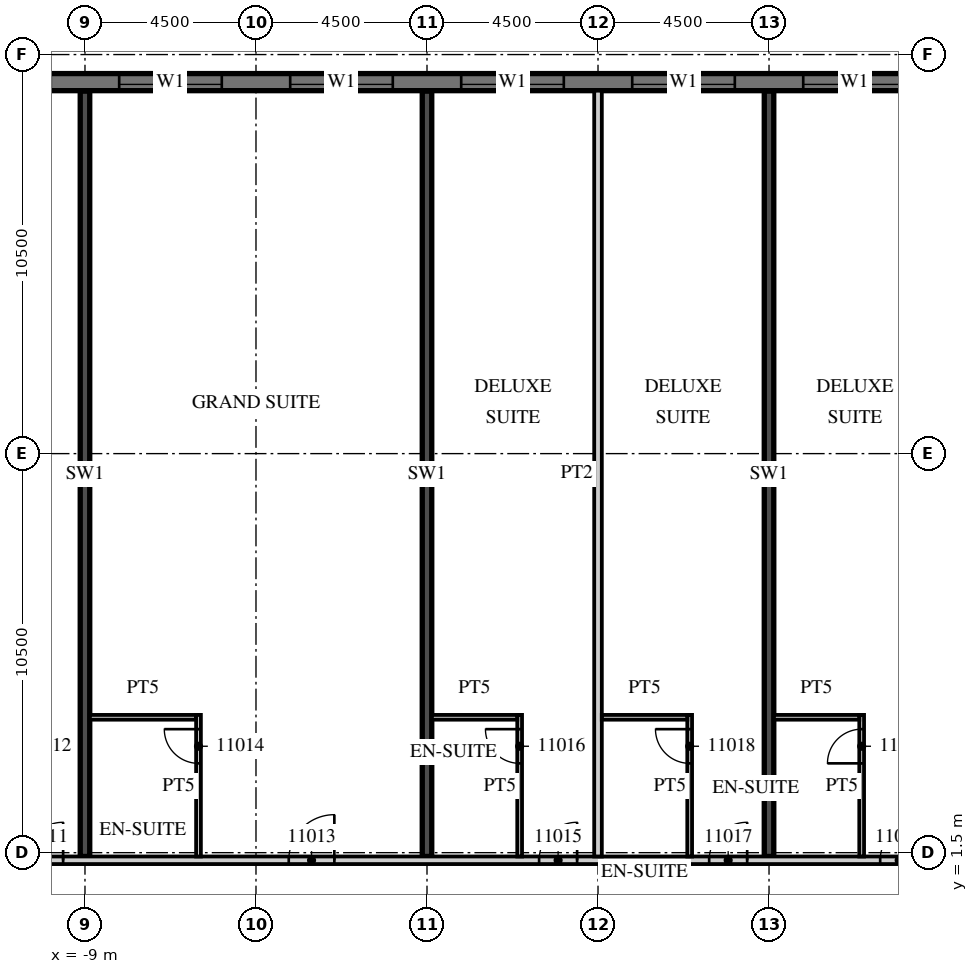
"""IFC4 building model, lengths in metres.
Left out: names, types, materials, properties, quantities, classifications, styles, units other than length and angle.
Written with IfcOpenShell. Run it as: python <this file> out.ifc"""

import sys

from ifc_helpers import new_model, si_unit, direction, frame, frame_2d, origin, place, context, subcontext, project, spatial, rectangle, extrude, element, fill, save


model = new_model("IFC4")
c1 = context("Model", 3, precision=1e-05, world=origin(), true_north=direction((0.0, 1.0)))
c2 = subcontext(c1, "Body", "Model", "MODEL_VIEW")
j1 = project(units=[si_unit("LENGTHUNIT", "METRE"), si_unit("PLANEANGLEUNIT", "RADIAN")], contexts=[c1])
p1 = place(None, origin())
s1 = spatial("IfcSite", under=j1, at=p1, CompositionType="ELEMENT")
p2 = place(p1, origin())
s2 = spatial("IfcBuilding", under=s1, at=p2, CompositionType="ELEMENT")
p3 = place(p2, frame((0.0, 0.0, 66.6)))
s3 = spatial("IfcBuildingStorey", under=s2, at=p3, CompositionType="ELEMENT", Elevation=66.6)
for number, where, z_axis, x_axis in (
    (1, (-9.0, 1.4, 0.0), (0.0, 0.0, 1.0), (0.0, 1.0, 0.0)),
    (2, (0.0, 1.4, 0.0), (0.0, 0.0, 1.0), (0.0, 1.0, 0.0)),
    (3, (9.0, 1.4, 0.0), (0.0, 0.0, 1.0), (0.0, 1.0, 0.0)),
):
    element("IfcWall", number, at=place(p3, frame(where, z_axis=z_axis, x_axis=x_axis)), inside=s3, PredefinedType="SHEAR", context=c2, shape_type="SweptSolid", body=[
        extrude(rectangle(XDim=20.14, YDim=0.25, at=frame_2d((10.07, 0.0))), origin(), (0.0, 0.0, 1.0), 3.3),
    ])
p4 = place(p3, frame((13.5, 21.775, 0.0), z_axis=(0.0, 0.0, 1.0), x_axis=(-1.0, 0.0, 0.0)))
e4 = element("IfcWall", 4, at=p4, inside=s3, PredefinedType="SOLIDWALL", context=c2, shape_type="SweptSolid", body=[
    extrude(rectangle(XDim=54.5, YDim=0.45, at=frame_2d((27.25, 0.0))), origin(), (0.0, 0.0, 1.0), 3.02),
])
p5 = place(p4, frame((0.9, 0.0, 0.45)))
e5 = element("IfcOpeningElement", 5, at=p5, cuts=e4, PredefinedType="OPENING", context=c2, shape_type="SweptSolid", body=[
    extrude(rectangle(XDim=2.7, YDim=2.25, at=frame_2d((1.35, 1.125))), frame((0.0, 0.235, 0.0), z_axis=(0.0, -1.0, 0.0), x_axis=(1.0, 0.0, 0.0)), (0.0, 0.0, 1.0), 0.47),
])
p6 = place(p4, frame((5.4, 0.0, 0.45)))
e6 = element("IfcOpeningElement", 6, at=p6, cuts=e4, PredefinedType="OPENING", context=c2, shape_type="SweptSolid", body=[
    extrude(rectangle(XDim=2.7, YDim=2.25, at=frame_2d((1.35, 1.125))), frame((0.0, 0.235, 0.0), z_axis=(0.0, -1.0, 0.0), x_axis=(1.0, 0.0, 0.0)), (0.0, 0.0, 1.0), 0.47),
])
p7 = place(p4, frame((9.9, 0.0, 0.45)))
e7 = element("IfcOpeningElement", 7, at=p7, cuts=e4, PredefinedType="OPENING", context=c2, shape_type="SweptSolid", body=[
    extrude(rectangle(XDim=2.7, YDim=2.25, at=frame_2d((1.35, 1.125))), frame((0.0, 0.235, 0.0), z_axis=(0.0, -1.0, 0.0), x_axis=(1.0, 0.0, 0.0)), (0.0, 0.0, 1.0), 0.47),
])
p8 = place(p4, frame((14.4, 0.0, 0.45)))
e8 = element("IfcOpeningElement", 8, at=p8, cuts=e4, PredefinedType="OPENING", context=c2, shape_type="SweptSolid", body=[
    extrude(rectangle(XDim=2.7, YDim=2.25, at=frame_2d((1.35, 1.125))), frame((0.0, 0.235, 0.0), z_axis=(0.0, -1.0, 0.0), x_axis=(1.0, 0.0, 0.0)), (0.0, 0.0, 1.0), 0.47),
])
p9 = place(p4, frame((18.9, 0.0, 0.45)))
e9 = element("IfcOpeningElement", 9, at=p9, cuts=e4, PredefinedType="OPENING", context=c2, shape_type="SweptSolid", body=[
    extrude(rectangle(XDim=2.7, YDim=2.25, at=frame_2d((1.35, 1.125))), frame((0.0, 0.235, 0.0), z_axis=(0.0, -1.0, 0.0), x_axis=(1.0, 0.0, 0.0)), (0.0, 0.0, 1.0), 0.47),
])
p10 = place(p4, frame((23.4, 0.0, 0.45)))
e10 = element("IfcOpeningElement", 10, at=p10, cuts=e4, PredefinedType="OPENING", context=c2, shape_type="SweptSolid", body=[
    extrude(rectangle(XDim=2.7, YDim=2.25, at=frame_2d((1.35, 1.125))), frame((0.0, 0.235, 0.0), z_axis=(0.0, -1.0, 0.0), x_axis=(1.0, 0.0, 0.0)), (0.0, 0.0, 1.0), 0.47),
])
p11 = place(p4, frame((27.9, 0.0, 0.45)))
e11 = element("IfcOpeningElement", 11, at=p11, cuts=e4, PredefinedType="OPENING", context=c2, shape_type="SweptSolid", body=[
    extrude(rectangle(XDim=2.7, YDim=2.25, at=frame_2d((1.35, 1.125))), frame((0.0, 0.235, 0.0), z_axis=(0.0, -1.0, 0.0), x_axis=(1.0, 0.0, 0.0)), (0.0, 0.0, 1.0), 0.47),
])
p12 = place(p4, frame((32.4, 0.0, 0.45)))
e12 = element("IfcOpeningElement", 12, at=p12, cuts=e4, PredefinedType="OPENING", context=c2, shape_type="SweptSolid", body=[
    extrude(rectangle(XDim=2.7, YDim=2.25, at=frame_2d((1.35, 1.125))), frame((0.0, 0.235, 0.0), z_axis=(0.0, -1.0, 0.0), x_axis=(1.0, 0.0, 0.0)), (0.0, 0.0, 1.0), 0.47),
])
p13 = place(p4, frame((36.9, 0.0, 0.45)))
e13 = element("IfcOpeningElement", 13, at=p13, cuts=e4, PredefinedType="OPENING", context=c2, shape_type="SweptSolid", body=[
    extrude(rectangle(XDim=2.7, YDim=2.25, at=frame_2d((1.35, 1.125))), frame((0.0, 0.235, 0.0), z_axis=(0.0, -1.0, 0.0), x_axis=(1.0, 0.0, 0.0)), (0.0, 0.0, 1.0), 0.47),
])
p14 = place(p4, frame((41.4, 0.0, 0.45)))
e14 = element("IfcOpeningElement", 14, at=p14, cuts=e4, PredefinedType="OPENING", context=c2, shape_type="SweptSolid", body=[
    extrude(rectangle(XDim=2.7, YDim=2.25, at=frame_2d((1.35, 1.125))), frame((0.0, 0.235, 0.0), z_axis=(0.0, -1.0, 0.0), x_axis=(1.0, 0.0, 0.0)), (0.0, 0.0, 1.0), 0.47),
])
p15 = place(p4, frame((45.9, 0.0, 0.45)))
e15 = element("IfcOpeningElement", 15, at=p15, cuts=e4, PredefinedType="OPENING", context=c2, shape_type="SweptSolid", body=[
    extrude(rectangle(XDim=2.7, YDim=2.25, at=frame_2d((1.35, 1.125))), frame((0.0, 0.235, 0.0), z_axis=(0.0, -1.0, 0.0), x_axis=(1.0, 0.0, 0.0)), (0.0, 0.0, 1.0), 0.47),
])
p16 = place(p4, frame((50.4, 0.0, 0.45)))
e16 = element("IfcOpeningElement", 16, at=p16, cuts=e4, PredefinedType="OPENING", context=c2, shape_type="SweptSolid", body=[
    extrude(rectangle(XDim=2.7, YDim=2.25, at=frame_2d((1.35, 1.125))), frame((0.0, 0.235, 0.0), z_axis=(0.0, -1.0, 0.0), x_axis=(1.0, 0.0, 0.0)), (0.0, 0.0, 1.0), 0.47),
])
p17 = place(p3, frame((-44.55, 1.3, 0.0), z_axis=(0.0, 0.0, 1.0), x_axis=(1.0, 0.0, 0.0)))
e17 = element("IfcWall", 17, at=p17, inside=s3, PredefinedType="PARTITIONING", context=c2, shape_type="SweptSolid", body=[
    extrude(rectangle(XDim=58.05, YDim=0.2, at=frame_2d((29.025, 0.0))), origin(), (0.0, 0.0, 1.0), 3.02),
])
p18 = place(p17, frame((0.525, 0.0, 0.0)))
e18 = element("IfcOpeningElement", 18, at=p18, cuts=e17, PredefinedType="OPENING", context=c2, shape_type="SweptSolid", body=[
    extrude(rectangle(XDim=1.0, YDim=2.1, at=frame_2d((0.5, 1.05))), frame((0.0, 0.11, 0.0), z_axis=(0.0, -1.0, 0.0), x_axis=(1.0, 0.0, 0.0)), (0.0, 0.0, 1.0), 0.22),
])
p19 = place(p17, frame((6.975, 0.0, 0.0)))
e19 = element("IfcOpeningElement", 19, at=p19, cuts=e17, PredefinedType="OPENING", context=c2, shape_type="SweptSolid", body=[
    extrude(rectangle(XDim=1.0, YDim=2.1, at=frame_2d((0.5, 1.05))), frame((0.0, 0.11, 0.0), z_axis=(0.0, -1.0, 0.0), x_axis=(1.0, 0.0, 0.0)), (0.0, 0.0, 1.0), 0.22),
])
p20 = place(p17, frame((10.987, 0.0, 0.0)))
e20 = element("IfcOpeningElement", 20, at=p20, cuts=e17, PredefinedType="OPENING", context=c2, shape_type="SweptSolid", body=[
    extrude(rectangle(XDim=1.2, YDim=2.1, at=frame_2d((0.6, 1.05))), frame((0.0, 0.11, 0.0), z_axis=(0.0, -1.0, 0.0), x_axis=(1.0, 0.0, 0.0)), (0.0, 0.0, 1.0), 0.22),
])
p21 = place(p17, frame((19.987, 0.0, 0.0)))
e21 = element("IfcOpeningElement", 21, at=p21, cuts=e17, PredefinedType="OPENING", context=c2, shape_type="SweptSolid", body=[
    extrude(rectangle(XDim=1.2, YDim=2.1, at=frame_2d((0.6, 1.05))), frame((0.0, 0.11, 0.0), z_axis=(0.0, -1.0, 0.0), x_axis=(1.0, 0.0, 0.0)), (0.0, 0.0, 1.0), 0.22),
])
p22 = place(p17, frame((29.5, 0.0, 0.0)))
e22 = element("IfcOpeningElement", 22, at=p22, cuts=e17, PredefinedType="OPENING", context=c2, shape_type="SweptSolid", body=[
    extrude(rectangle(XDim=1.0, YDim=2.1, at=frame_2d((0.5, 1.05))), frame((0.0, 0.11, 0.0), z_axis=(0.0, -1.0, 0.0), x_axis=(1.0, 0.0, 0.0)), (0.0, 0.0, 1.0), 0.22),
])
p23 = place(p17, frame((33.975, 0.0, 0.0)))
e23 = element("IfcOpeningElement", 23, at=p23, cuts=e17, PredefinedType="OPENING", context=c2, shape_type="SweptSolid", body=[
    extrude(rectangle(XDim=1.0, YDim=2.1, at=frame_2d((0.5, 1.05))), frame((0.0, 0.11, 0.0), z_axis=(0.0, -1.0, 0.0), x_axis=(1.0, 0.0, 0.0)), (0.0, 0.0, 1.0), 0.22),
])
p24 = place(p17, frame((40.912, 0.0, 0.0)))
e24 = element("IfcOpeningElement", 24, at=p24, cuts=e17, PredefinedType="OPENING", context=c2, shape_type="SweptSolid", body=[
    extrude(rectangle(XDim=1.2, YDim=2.1, at=frame_2d((0.6, 1.05))), frame((0.0, 0.11, 0.0), z_axis=(0.0, -1.0, 0.0), x_axis=(1.0, 0.0, 0.0)), (0.0, 0.0, 1.0), 0.22),
])
p25 = place(p17, frame((47.5, 0.0, 0.0)))
e25 = element("IfcOpeningElement", 25, at=p25, cuts=e17, PredefinedType="OPENING", context=c2, shape_type="SweptSolid", body=[
    extrude(rectangle(XDim=1.0, YDim=2.1, at=frame_2d((0.5, 1.05))), frame((0.0, 0.11, 0.0), z_axis=(0.0, -1.0, 0.0), x_axis=(1.0, 0.0, 0.0)), (0.0, 0.0, 1.0), 0.22),
])
p26 = place(p17, frame((51.975, 0.0, 0.0)))
e26 = element("IfcOpeningElement", 26, at=p26, cuts=e17, PredefinedType="OPENING", context=c2, shape_type="SweptSolid", body=[
    extrude(rectangle(XDim=1.0, YDim=2.1, at=frame_2d((0.5, 1.05))), frame((0.0, 0.11, 0.0), z_axis=(0.0, -1.0, 0.0), x_axis=(1.0, 0.0, 0.0)), (0.0, 0.0, 1.0), 0.22),
])
p27 = place(p17, frame((56.475, 0.0, 0.0)))
e27 = element("IfcOpeningElement", 27, at=p27, cuts=e17, PredefinedType="OPENING", context=c2, shape_type="SweptSolid", body=[
    extrude(rectangle(XDim=1.0, YDim=2.1, at=frame_2d((0.5, 1.05))), frame((0.0, 0.11, 0.0), z_axis=(0.0, -1.0, 0.0), x_axis=(1.0, 0.0, 0.0)), (0.0, 0.0, 1.0), 0.22),
])
p28 = place(p3, frame((-6.013, 1.4, 0.0), z_axis=(0.0, 0.0, 1.0), x_axis=(0.0, 1.0, 0.0)))
e28 = element("IfcWall", 28, at=p28, inside=s3, PredefinedType="PARTITIONING", context=c2, shape_type="SweptSolid", body=[
    extrude(rectangle(XDim=3.725, YDim=0.125, at=frame_2d((1.863, 0.0))), origin(), (0.0, 0.0, 1.0), 3.02),
])
p29 = place(p28, frame((2.45, 0.0, 0.0)))
e29 = element("IfcOpeningElement", 29, at=p29, cuts=e28, PredefinedType="OPENING", context=c2, shape_type="SweptSolid", body=[
    extrude(rectangle(XDim=0.9, YDim=2.1, at=frame_2d((0.45, 1.05))), frame((0.0, 0.073, 0.0), z_axis=(0.0, -1.0, 0.0), x_axis=(1.0, 0.0, 0.0)), (0.0, 0.0, 1.0), 0.145),
])
p30 = place(p3, frame((-8.875, 5.062, 0.0), z_axis=(0.0, 0.0, 1.0), x_axis=(1.0, 0.0, 0.0)))
e30 = element("IfcWall", 30, at=p30, inside=s3, PredefinedType="PARTITIONING", context=c2, shape_type="SweptSolid", body=[
    extrude(rectangle(XDim=2.8, YDim=0.125, at=frame_2d((1.4, 0.0))), origin(), (0.0, 0.0, 1.0), 3.02),
])
p31 = place(p3, frame((4.5, 1.4, 0.0), z_axis=(0.0, 0.0, 1.0), x_axis=(0.0, 1.0, 0.0)))
e31 = element("IfcWall", 31, at=p31, inside=s3, PredefinedType="PARTITIONING", context=c2, shape_type="SweptSolid", body=[
    extrude(rectangle(XDim=20.15, YDim=0.2, at=frame_2d((10.075, 0.0))), origin(), (0.0, 0.0, 1.0), 3.02),
])
p32 = place(p3, frame((2.438, 1.4, 0.0), z_axis=(0.0, 0.0, 1.0), x_axis=(0.0, 1.0, 0.0)))
e32 = element("IfcWall", 32, at=p32, inside=s3, PredefinedType="PARTITIONING", context=c2, shape_type="SweptSolid", body=[
    extrude(rectangle(XDim=3.725, YDim=0.125, at=frame_2d((1.863, 0.0))), origin(), (0.0, 0.0, 1.0), 3.02),
])
p33 = place(p32, frame((2.45, 0.0, 0.0)))
e33 = element("IfcOpeningElement", 33, at=p33, cuts=e32, PredefinedType="OPENING", context=c2, shape_type="SweptSolid", body=[
    extrude(rectangle(XDim=0.9, YDim=2.1, at=frame_2d((0.45, 1.05))), frame((0.0, 0.073, 0.0), z_axis=(0.0, -1.0, 0.0), x_axis=(1.0, 0.0, 0.0)), (0.0, 0.0, 1.0), 0.145),
])
p34 = place(p3, frame((0.125, 5.062, 0.0), z_axis=(0.0, 0.0, 1.0), x_axis=(1.0, 0.0, 0.0)))
e34 = element("IfcWall", 34, at=p34, inside=s3, PredefinedType="PARTITIONING", context=c2, shape_type="SweptSolid", body=[
    extrude(rectangle(XDim=2.25, YDim=0.125, at=frame_2d((1.125, 0.0))), origin(), (0.0, 0.0, 1.0), 3.02),
])
p35 = place(p3, frame((6.912, 1.4, 0.0), z_axis=(0.0, 0.0, 1.0), x_axis=(0.0, 1.0, 0.0)))
e35 = element("IfcWall", 35, at=p35, inside=s3, PredefinedType="PARTITIONING", context=c2, shape_type="SweptSolid", body=[
    extrude(rectangle(XDim=3.725, YDim=0.125, at=frame_2d((1.863, 0.0))), origin(), (0.0, 0.0, 1.0), 3.02),
])
p36 = place(p35, frame((2.45, 0.0, 0.0)))
e36 = element("IfcOpeningElement", 36, at=p36, cuts=e35, PredefinedType="OPENING", context=c2, shape_type="SweptSolid", body=[
    extrude(rectangle(XDim=0.9, YDim=2.1, at=frame_2d((0.45, 1.05))), frame((0.0, 0.073, 0.0), z_axis=(0.0, -1.0, 0.0), x_axis=(1.0, 0.0, 0.0)), (0.0, 0.0, 1.0), 0.145),
])
p37 = place(p3, frame((4.6, 5.062, 0.0), z_axis=(0.0, 0.0, 1.0), x_axis=(1.0, 0.0, 0.0)))
e37 = element("IfcWall", 37, at=p37, inside=s3, PredefinedType="PARTITIONING", context=c2, shape_type="SweptSolid", body=[
    extrude(rectangle(XDim=2.25, YDim=0.125, at=frame_2d((1.125, 0.0))), origin(), (0.0, 0.0, 1.0), 3.02),
])
p38 = place(p3, frame((11.438, 1.4, 0.0), z_axis=(0.0, 0.0, 1.0), x_axis=(0.0, 1.0, 0.0)))
e38 = element("IfcWall", 38, at=p38, inside=s3, PredefinedType="PARTITIONING", context=c2, shape_type="SweptSolid", body=[
    extrude(rectangle(XDim=3.725, YDim=0.125, at=frame_2d((1.863, 0.0))), origin(), (0.0, 0.0, 1.0), 3.02),
])
p39 = place(p38, frame((2.45, 0.0, 0.0)))
e39 = element("IfcOpeningElement", 39, at=p39, cuts=e38, PredefinedType="OPENING", context=c2, shape_type="SweptSolid", body=[
    extrude(rectangle(XDim=0.9, YDim=2.1, at=frame_2d((0.45, 1.05))), frame((0.0, 0.073, 0.0), z_axis=(0.0, -1.0, 0.0), x_axis=(1.0, 0.0, 0.0)), (0.0, 0.0, 1.0), 0.145),
])
p40 = place(p3, frame((9.125, 5.062, 0.0), z_axis=(0.0, 0.0, 1.0), x_axis=(1.0, 0.0, 0.0)))
e40 = element("IfcWall", 40, at=p40, inside=s3, PredefinedType="PARTITIONING", context=c2, shape_type="SweptSolid", body=[
    extrude(rectangle(XDim=2.25, YDim=0.125, at=frame_2d((1.125, 0.0))), origin(), (0.0, 0.0, 1.0), 3.02),
])
p41 = place(p5, origin())
e41 = element("IfcWindow", 41, at=p41, inside=s3, PartitioningType="SINGLE_PANEL", PredefinedType="WINDOW", context=c2, shape_type="SweptSolid", body=[
    extrude(rectangle(XDim=2.7, YDim=2.25, at=frame_2d((1.35, 1.125))), frame((0.0, 0.09, 0.0), z_axis=(0.0, -1.0, 0.0), x_axis=(1.0, 0.0, 0.0)), (0.0, 0.0, 1.0), 0.06),
])
fill(e5, e41)
p42 = place(p6, origin())
e42 = element("IfcWindow", 42, at=p42, inside=s3, PartitioningType="SINGLE_PANEL", PredefinedType="WINDOW", context=c2, shape_type="SweptSolid", body=[
    extrude(rectangle(XDim=2.7, YDim=2.25, at=frame_2d((1.35, 1.125))), frame((0.0, 0.09, 0.0), z_axis=(0.0, -1.0, 0.0), x_axis=(1.0, 0.0, 0.0)), (0.0, 0.0, 1.0), 0.06),
])
fill(e6, e42)
p43 = place(p7, origin())
e43 = element("IfcWindow", 43, at=p43, inside=s3, PartitioningType="SINGLE_PANEL", PredefinedType="WINDOW", context=c2, shape_type="SweptSolid", body=[
    extrude(rectangle(XDim=2.7, YDim=2.25, at=frame_2d((1.35, 1.125))), frame((0.0, 0.09, 0.0), z_axis=(0.0, -1.0, 0.0), x_axis=(1.0, 0.0, 0.0)), (0.0, 0.0, 1.0), 0.06),
])
fill(e7, e43)
p44 = place(p8, origin())
e44 = element("IfcWindow", 44, at=p44, inside=s3, PartitioningType="SINGLE_PANEL", PredefinedType="WINDOW", context=c2, shape_type="SweptSolid", body=[
    extrude(rectangle(XDim=2.7, YDim=2.25, at=frame_2d((1.35, 1.125))), frame((0.0, 0.09, 0.0), z_axis=(0.0, -1.0, 0.0), x_axis=(1.0, 0.0, 0.0)), (0.0, 0.0, 1.0), 0.06),
])
fill(e8, e44)
p45 = place(p9, origin())
e45 = element("IfcWindow", 45, at=p45, inside=s3, PartitioningType="SINGLE_PANEL", PredefinedType="WINDOW", context=c2, shape_type="SweptSolid", body=[
    extrude(rectangle(XDim=2.7, YDim=2.25, at=frame_2d((1.35, 1.125))), frame((0.0, 0.09, 0.0), z_axis=(0.0, -1.0, 0.0), x_axis=(1.0, 0.0, 0.0)), (0.0, 0.0, 1.0), 0.06),
])
fill(e9, e45)
p46 = place(p23, origin())
e46 = element("IfcDoor", 46, at=p46, inside=s3, OperationType="SINGLE_SWING_RIGHT", PredefinedType="DOOR", context=c2, shape_type="SweptSolid", body=[
    extrude(rectangle(XDim=1.0, YDim=2.1, at=frame_2d((0.5, 1.05))), frame((0.0, 0.025, 0.0), z_axis=(0.0, -1.0, 0.0), x_axis=(1.0, 0.0, 0.0)), (0.0, 0.0, 1.0), 0.05),
])
fill(e23, e46)
p47 = place(p24, origin())
e47 = element("IfcDoor", 47, at=p47, inside=s3, OperationType="SINGLE_SWING_RIGHT", PredefinedType="DOOR", context=c2, shape_type="SweptSolid", body=[
    extrude(rectangle(XDim=1.2, YDim=2.1, at=frame_2d((0.6, 1.05))), frame((0.0, 0.025, 0.0), z_axis=(0.0, -1.0, 0.0), x_axis=(1.0, 0.0, 0.0)), (0.0, 0.0, 1.0), 0.05),
])
fill(e24, e47)
p48 = place(p29, origin())
e48 = element("IfcDoor", 48, at=p48, inside=s3, OperationType="SINGLE_SWING_RIGHT", PredefinedType="DOOR", context=c2, shape_type="SweptSolid", body=[
    extrude(rectangle(XDim=0.9, YDim=2.1, at=frame_2d((0.45, 1.05))), frame((0.0, 0.025, 0.0), z_axis=(0.0, -1.0, 0.0), x_axis=(1.0, 0.0, 0.0)), (0.0, 0.0, 1.0), 0.05),
])
fill(e29, e48)
p49 = place(p25, origin())
e49 = element("IfcDoor", 49, at=p49, inside=s3, OperationType="SINGLE_SWING_RIGHT", PredefinedType="DOOR", context=c2, shape_type="SweptSolid", body=[
    extrude(rectangle(XDim=1.0, YDim=2.1, at=frame_2d((0.5, 1.05))), frame((0.0, 0.025, 0.0), z_axis=(0.0, -1.0, 0.0), x_axis=(1.0, 0.0, 0.0)), (0.0, 0.0, 1.0), 0.05),
])
fill(e25, e49)
p50 = place(p33, origin())
e50 = element("IfcDoor", 50, at=p50, inside=s3, OperationType="SINGLE_SWING_RIGHT", PredefinedType="DOOR", context=c2, shape_type="SweptSolid", body=[
    extrude(rectangle(XDim=0.9, YDim=2.1, at=frame_2d((0.45, 1.05))), frame((0.0, 0.025, 0.0), z_axis=(0.0, -1.0, 0.0), x_axis=(1.0, 0.0, 0.0)), (0.0, 0.0, 1.0), 0.05),
])
fill(e33, e50)
p51 = place(p26, origin())
e51 = element("IfcDoor", 51, at=p51, inside=s3, OperationType="SINGLE_SWING_RIGHT", PredefinedType="DOOR", context=c2, shape_type="SweptSolid", body=[
    extrude(rectangle(XDim=1.0, YDim=2.1, at=frame_2d((0.5, 1.05))), frame((0.0, 0.025, 0.0), z_axis=(0.0, -1.0, 0.0), x_axis=(1.0, 0.0, 0.0)), (0.0, 0.0, 1.0), 0.05),
])
fill(e26, e51)
p52 = place(p36, origin())
e52 = element("IfcDoor", 52, at=p52, inside=s3, OperationType="SINGLE_SWING_RIGHT", PredefinedType="DOOR", context=c2, shape_type="SweptSolid", body=[
    extrude(rectangle(XDim=0.9, YDim=2.1, at=frame_2d((0.45, 1.05))), frame((0.0, 0.025, 0.0), z_axis=(0.0, -1.0, 0.0), x_axis=(1.0, 0.0, 0.0)), (0.0, 0.0, 1.0), 0.05),
])
fill(e36, e52)
p53 = place(p27, origin())
e53 = element("IfcDoor", 53, at=p53, inside=s3, OperationType="SINGLE_SWING_RIGHT", PredefinedType="DOOR", context=c2, shape_type="SweptSolid", body=[
    extrude(rectangle(XDim=1.0, YDim=2.1, at=frame_2d((0.5, 1.05))), frame((0.0, 0.025, 0.0), z_axis=(0.0, -1.0, 0.0), x_axis=(1.0, 0.0, 0.0)), (0.0, 0.0, 1.0), 0.05),
])
fill(e27, e53)
p54 = place(p39, origin())
e54 = element("IfcDoor", 54, at=p54, inside=s3, OperationType="SINGLE_SWING_LEFT", PredefinedType="DOOR", context=c2, shape_type="SweptSolid", body=[
    extrude(rectangle(XDim=0.9, YDim=2.1, at=frame_2d((0.45, 1.05))), frame((0.0, 0.025, 0.0), z_axis=(0.0, -1.0, 0.0), x_axis=(1.0, 0.0, 0.0)), (0.0, 0.0, 1.0), 0.05),
])
fill(e39, e54)
save(model, sys.argv[1])
